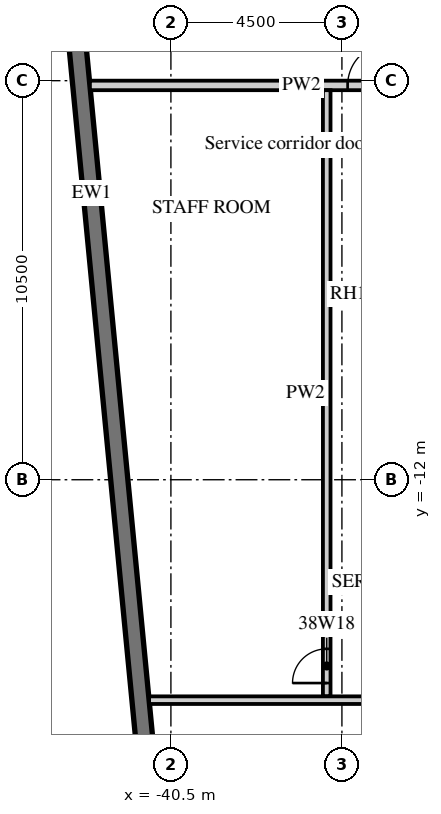
"""IFC4 building model, lengths in metres.
Left out: names, types, materials, properties, quantities, classifications, styles, units other than length and angle.
Written with IfcOpenShell. Run it as: python <this file> out.ifc"""

import sys

from ifc_helpers import new_model, si_unit, direction, frame, frame_2d, origin, place, context, subcontext, project, spatial, rectangle, extrude, element, fill, save


model = new_model("IFC4")
c1 = context("Model", 3, precision=1e-05, world=origin(), true_north=direction((0.0, 1.0)))
c2 = subcontext(c1, "Body", "Model", "MODEL_VIEW")
j1 = project(units=[si_unit("LENGTHUNIT", "METRE"), si_unit("PLANEANGLEUNIT", "RADIAN")], contexts=[c1])
p1 = place(None, origin())
s1 = spatial("IfcSite", under=j1, at=p1, CompositionType="ELEMENT")
p2 = place(p1, origin())
s2 = spatial("IfcBuilding", under=s1, at=p2, CompositionType="ELEMENT")
p3 = place(p2, frame((0.0, 0.0, 166.9)))
s3 = spatial("IfcBuildingStorey", under=s2, at=p3, CompositionType="ELEMENT", Elevation=166.9)
p4 = place(p3, frame((-44.214, 12.466, 0.0), z_axis=(0.0, 0.0, 1.0), x_axis=(0.095847314626, -0.995396047952, 0.0)))
e1 = element("IfcWall", 1, at=p4, inside=s3, PredefinedType="SOLIDWALL", context=c2, shape_type="SweptSolid", body=[
    extrude(rectangle(XDim=34.0, YDim=0.45, at=frame_2d((17.0, 0.0))), origin(), (0.0, 0.0, 1.0), 3.02),
])
p5 = place(p4, frame((2.865, 0.0, 0.45)))
e2 = element("IfcOpeningElement", 2, at=p5, cuts=e1, PredefinedType="OPENING", context=c2, shape_type="SweptSolid", body=[
    extrude(rectangle(XDim=3.3, YDim=2.25, at=frame_2d((1.65, 1.125))), frame((0.0, 0.235, 0.0), z_axis=(0.0, -1.0, 0.0), x_axis=(1.0, 0.0, 0.0)), (0.0, 0.0, 1.0), 0.47),
])
p6 = place(p4, frame((7.386, 0.0, 0.45)))
e3 = element("IfcOpeningElement", 3, at=p6, cuts=e1, PredefinedType="OPENING", context=c2, shape_type="SweptSolid", body=[
    extrude(rectangle(XDim=3.3, YDim=2.25, at=frame_2d((1.65, 1.125))), frame((0.0, 0.235, 0.0), z_axis=(0.0, -1.0, 0.0), x_axis=(1.0, 0.0, 0.0)), (0.0, 0.0, 1.0), 0.47),
])
p7 = place(p3, frame((-42.632, -1.625, 0.0), z_axis=(0.0, 0.0, 1.0), x_axis=(1.0, 0.0, 0.0)))
e4 = element("IfcWall", 4, at=p7, inside=s3, PredefinedType="PARTITIONING", context=c2, shape_type="SweptSolid", body=[
    extrude(rectangle(XDim=11.132, YDim=0.25, at=frame_2d((5.566, 0.0))), origin(), (0.0, 0.0, 1.0), 3.02),
])
p8 = place(p7, frame((9.207, 0.0, 0.0)))
e5 = element("IfcOpeningElement", 5, at=p8, cuts=e4, PredefinedType="OPENING", context=c2, shape_type="SweptSolid", body=[
    extrude(rectangle(XDim=1.3, YDim=2.1, at=frame_2d((0.65, 1.05))), frame((0.0, 0.135, 0.0), z_axis=(0.0, -1.0, 0.0), x_axis=(1.0, 0.0, 0.0)), (0.0, 0.0, 1.0), 0.27),
])
p9 = place(p7, frame((6.781, 0.0, 0.0)))
e6 = element("IfcOpeningElement", 6, at=p9, cuts=e4, PredefinedType="OPENING", context=c2, shape_type="SweptSolid", body=[
    extrude(rectangle(XDim=1.1, YDim=2.1, at=frame_2d((0.55, 1.05))), frame((0.0, 0.135, 0.0), z_axis=(0.0, -1.0, 0.0), x_axis=(1.0, 0.0, 0.0)), (0.0, 0.0, 1.0), 0.27),
])
p10 = place(p3, frame((-36.4, -17.7, 0.0), z_axis=(0.0, 0.0, 1.0), x_axis=(0.0, 1.0, 0.0)))
e7 = element("IfcWall", 7, at=p10, inside=s3, PredefinedType="PARTITIONING", context=c2, shape_type="SweptSolid", body=[
    extrude(rectangle(XDim=15.95, YDim=0.2, at=frame_2d((7.975, 0.0))), origin(), (0.0, 0.0, 1.0), 3.02),
])
p11 = place(p10, frame((0.35, 0.0, 0.0)))
e8 = element("IfcOpeningElement", 8, at=p11, cuts=e7, PredefinedType="OPENING", context=c2, shape_type="SweptSolid", body=[
    extrude(rectangle(XDim=0.9, YDim=2.1, at=frame_2d((0.45, 1.05))), frame((0.0, 0.11, 0.0), z_axis=(0.0, -1.0, 0.0), x_axis=(1.0, 0.0, 0.0)), (0.0, 0.0, 1.0), 0.22),
])
p12 = place(p3, frame((-41.074, -17.8, 0.0), z_axis=(0.0, 0.0, 1.0), x_axis=(1.0, 0.0, 0.0)))
e9 = element("IfcWall", 9, at=p12, inside=s3, PredefinedType="PARTITIONING", context=c2, shape_type="SweptSolid", body=[
    extrude(rectangle(XDim=27.474, YDim=0.2, at=frame_2d((13.737, 0.0))), origin(), (0.0, 0.0, 1.0), 3.02),
])
p13 = place(p12, frame((8.762, 0.0, 0.0)))
e10 = element("IfcOpeningElement", 10, at=p13, cuts=e9, PredefinedType="OPENING", context=c2, shape_type="SweptSolid", body=[
    extrude(rectangle(XDim=0.9, YDim=2.1, at=frame_2d((0.45, 1.05))), frame((0.0, 0.11, 0.0), z_axis=(0.0, -1.0, 0.0), x_axis=(1.0, 0.0, 0.0)), (0.0, 0.0, 1.0), 0.22),
])
p14 = place(p12, frame((17.062, 0.0, 0.0)))
e11 = element("IfcOpeningElement", 11, at=p14, cuts=e9, PredefinedType="OPENING", context=c2, shape_type="SweptSolid", body=[
    extrude(rectangle(XDim=0.9, YDim=2.1, at=frame_2d((0.45, 1.05))), frame((0.0, 0.11, 0.0), z_axis=(0.0, -1.0, 0.0), x_axis=(1.0, 0.0, 0.0)), (0.0, 0.0, 1.0), 0.22),
])
p15 = place(p9, origin())
e12 = element("IfcDoor", 12, at=p15, inside=s3, OperationType="SINGLE_SWING_RIGHT", PredefinedType="DOOR", context=c2, shape_type="SweptSolid", body=[
    extrude(rectangle(XDim=1.1, YDim=2.1, at=frame_2d((0.55, 1.05))), frame((0.0, 0.025, 0.0), z_axis=(0.0, -1.0, 0.0), x_axis=(1.0, 0.0, 0.0)), (0.0, 0.0, 1.0), 0.05),
])
fill(e6, e12)
p16 = place(p11, origin())
e13 = element("IfcDoor", 13, at=p16, inside=s3, OperationType="SINGLE_SWING_LEFT", PredefinedType="DOOR", context=c2, shape_type="SweptSolid", body=[
    extrude(rectangle(XDim=0.9, YDim=2.1, at=frame_2d((0.45, 1.05))), frame((0.0, 0.025, 0.0), z_axis=(0.0, -1.0, 0.0), x_axis=(1.0, 0.0, 0.0)), (0.0, 0.0, 1.0), 0.05),
])
fill(e8, e13)
save(model, sys.argv[1])
